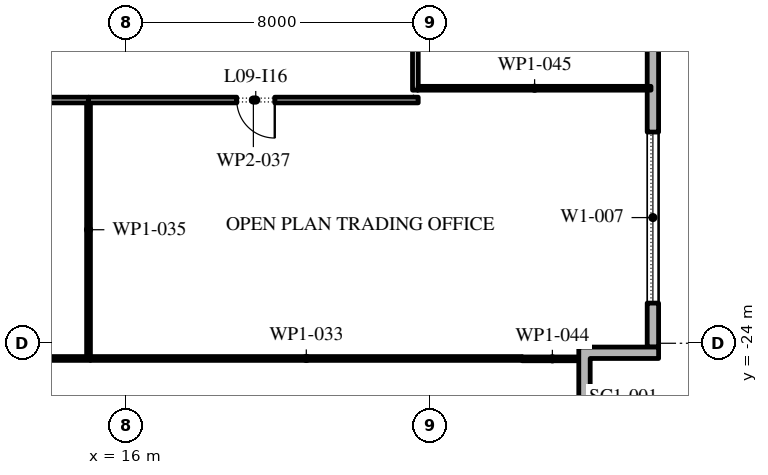
"""IFC4 building model, lengths in metres.
Left out: names, types, materials, properties, quantities, classifications, styles, units other than length and angle.
Written with IfcOpenShell. Run it as: python <this file> out.ifc"""

import sys

from ifc_helpers import new_model, si_unit, direction, frame, frame_2d, origin, place, context, subcontext, project, spatial, polyline, rectangle, outline, extrude, element, fill, save


model = new_model("IFC4")
c1 = context("Model", 3, precision=1e-05, world=origin(), true_north=direction((0.0, 1.0)))
c2 = subcontext(c1, "Body", "Model", "MODEL_VIEW")
j1 = project(units=[si_unit("LENGTHUNIT", "METRE"), si_unit("PLANEANGLEUNIT", "RADIAN")], contexts=[c1])
p1 = place(None, origin())
s1 = spatial("IfcSite", under=j1, at=p1, CompositionType="ELEMENT")
p2 = place(p1, origin())
s2 = spatial("IfcBuilding", under=s1, at=p2, CompositionType="ELEMENT")
p3 = place(p2, frame((0.0, 0.0, 48.0)))
s3 = spatial("IfcBuildingStorey", under=s2, at=p3, CompositionType="ELEMENT", Elevation=48.0)
p4 = place(p3, frame((29.85, -24.1, 0.0), z_axis=(0.0, 0.0, 1.0), x_axis=(0.0, 1.0, 0.0)))
e1 = element("IfcWall", 1, at=p4, inside=s3, PredefinedType="STANDARD", context=c2, shape_type="SweptSolid", body=[
    extrude(rectangle(XDim=49.5, YDim=0.3, at=frame_2d((24.75, 0.0))), origin(), (0.0, 0.0, 1.0), 4.0),
])
p5 = place(p4, frame((1.157, 0.0, 0.45)))
e2 = element("IfcOpeningElement", 2, at=p5, cuts=e1, PredefinedType="OPENING", context=c2, shape_type="SweptSolid", body=[
    extrude(rectangle(XDim=4.5, YDim=3.05, at=frame_2d((2.25, 1.525))), frame((0.0, 0.16, 0.0), z_axis=(0.0, -1.0, 0.0), x_axis=(1.0, 0.0, 0.0)), (0.0, 0.0, 1.0), 0.32),
])
p6 = place(p4, frame((8.121, 0.0, 0.45)))
e3 = element("IfcOpeningElement", 3, at=p6, cuts=e1, PredefinedType="OPENING", context=c2, shape_type="SweptSolid", body=[
    extrude(rectangle(XDim=4.5, YDim=2.825, at=frame_2d((2.25, 1.413))), frame((0.0, 0.16, 0.0), z_axis=(0.0, -1.0, 0.0), x_axis=(1.0, 0.0, 0.0)), (0.0, 0.0, 1.0), 0.32),
])
p7 = place(p4, frame((16.286, 0.0, 0.0)))
e4 = element("IfcOpeningElement", 4, at=p7, cuts=e1, PredefinedType="OPENING", context=c2, shape_type="SweptSolid", body=[
    extrude(rectangle(XDim=2.4, YDim=3.325, at=frame_2d((1.2, 1.663))), frame((0.0, 0.16, 0.0), z_axis=(0.0, -1.0, 0.0), x_axis=(1.0, 0.0, 0.0)), (0.0, 0.0, 1.0), 0.32),
])
p8 = place(p4, frame((22.35, 0.0, 0.45)))
e5 = element("IfcOpeningElement", 5, at=p8, cuts=e1, PredefinedType="OPENING", context=c2, shape_type="SweptSolid", body=[
    extrude(rectangle(XDim=4.5, YDim=2.875, at=frame_2d((2.25, 1.438))), frame((0.0, 0.16, 0.0), z_axis=(0.0, -1.0, 0.0), x_axis=(1.0, 0.0, 0.0)), (0.0, 0.0, 1.0), 0.32),
])
p9 = place(p4, frame((29.464, 0.0, 0.45)))
e6 = element("IfcOpeningElement", 6, at=p9, cuts=e1, PredefinedType="OPENING", context=c2, shape_type="SweptSolid", body=[
    extrude(rectangle(XDim=4.5, YDim=2.875, at=frame_2d((2.25, 1.438))), frame((0.0, 0.16, 0.0), z_axis=(0.0, -1.0, 0.0), x_axis=(1.0, 0.0, 0.0)), (0.0, 0.0, 1.0), 0.32),
])
p10 = place(p4, frame((36.579, 0.0, 0.45)))
e7 = element("IfcOpeningElement", 7, at=p10, cuts=e1, PredefinedType="OPENING", context=c2, shape_type="SweptSolid", body=[
    extrude(rectangle(XDim=4.5, YDim=3.05, at=frame_2d((2.25, 1.525))), frame((0.0, 0.16, 0.0), z_axis=(0.0, -1.0, 0.0), x_axis=(1.0, 0.0, 0.0)), (0.0, 0.0, 1.0), 0.32),
])
p11 = place(p4, frame((44.743, 0.0, 0.0)))
e8 = element("IfcOpeningElement", 8, at=p11, cuts=e1, PredefinedType="OPENING", context=c2, shape_type="SweptSolid", body=[
    extrude(rectangle(XDim=2.4, YDim=3.325, at=frame_2d((1.2, 1.663))), frame((0.0, 0.16, 0.0), z_axis=(0.0, -1.0, 0.0), x_axis=(1.0, 0.0, 0.0)), (0.0, 0.0, 1.0), 0.32),
])
p12 = place(p3, origin())
e9 = element("IfcWall", 9, at=p12, inside=s3, PredefinedType="STANDARD", context=c2, shape_type="SweptSolid", body=[
    extrude(outline(polyline([(27.9, -25.9), (27.9, -24.1), (30.0, -24.1), (30.0, -24.4), (28.2, -24.4), (28.2, -26.2), (26.4, -26.2), (26.4, -27.7), (26.1, -27.7), (26.1, -25.9), (27.9, -25.9)])), origin(), (0.0, 0.0, 1.0), 4.0),
])
p13 = place(p3, frame((1.45, -24.4, 0.0), z_axis=(0.0, 0.0, 1.0), x_axis=(1.0, 0.0, 0.0)))
e10 = element("IfcWall", 10, at=p13, inside=s3, PredefinedType="PARTITIONING", context=c2, shape_type="SweptSolid", body=[
    extrude(rectangle(XDim=13.6, YDim=0.1, at=frame_2d((6.8, 0.0))), origin(), (0.0, 0.0, 1.0), 4.0),
])
p14 = place(p3, frame((15.05, -24.4, 0.0), z_axis=(0.0, 0.0, 1.0), x_axis=(1.0, 0.0, 0.0)))
e11 = element("IfcWall", 11, at=p14, inside=s3, PredefinedType="PARTITIONING", context=c2, shape_type="SweptSolid", body=[
    extrude(rectangle(XDim=11.36, YDim=0.1, at=frame_2d((5.68, 0.0))), origin(), (0.0, 0.0, 1.0), 4.0),
])
p15 = place(p3, frame((15.0, -17.6, 0.0), z_axis=(0.0, 0.0, 1.0), x_axis=(-1.0, 0.0, 0.0)))
e12 = element("IfcWall", 12, at=p15, inside=s3, PredefinedType="PARTITIONING", context=c2, shape_type="SweptSolid", body=[
    extrude(rectangle(XDim=6.525, YDim=0.15, at=frame_2d((3.262, 0.0))), origin(), (0.0, 0.0, 1.0), 4.0),
])
p16 = place(p15, frame((2.7, 0.0, 0.0)))
e13 = element("IfcOpeningElement", 13, at=p16, cuts=e12, PredefinedType="OPENING", context=c2, shape_type="SweptSolid", body=[
    extrude(rectangle(XDim=1.0, YDim=2.1, at=frame_2d((0.5, 1.05))), frame((0.0, 0.085, 0.0), z_axis=(0.0, -1.0, 0.0), x_axis=(1.0, 0.0, 0.0)), (0.0, 0.0, 1.0), 0.17),
])
p17 = place(p3, frame((15.0, -17.675, 0.0), z_axis=(0.0, 0.0, 1.0), x_axis=(0.0, -1.0, 0.0)))
e14 = element("IfcWall", 14, at=p17, inside=s3, PredefinedType="PARTITIONING", context=c2, shape_type="SweptSolid", body=[
    extrude(rectangle(XDim=6.675, YDim=0.1, at=frame_2d((3.337, 0.0))), origin(), (0.0, 0.0, 1.0), 4.0),
])
p18 = place(p3, frame((23.675, -17.6, 0.0), z_axis=(0.0, 0.0, 1.0), x_axis=(-1.0, 0.0, 0.0)))
e15 = element("IfcWall", 15, at=p18, inside=s3, PredefinedType="PARTITIONING", context=c2, shape_type="SweptSolid", body=[
    extrude(rectangle(XDim=8.675, YDim=0.15, at=frame_2d((4.337, 0.0))), origin(), (0.0, 0.0, 1.0), 4.0),
])
p19 = place(p18, frame((3.775, 0.0, 0.0)))
e16 = element("IfcOpeningElement", 16, at=p19, cuts=e15, PredefinedType="OPENING", context=c2, shape_type="SweptSolid", body=[
    extrude(rectangle(XDim=1.0, YDim=2.1, at=frame_2d((0.5, 1.05))), frame((0.0, 0.085, 0.0), z_axis=(0.0, -1.0, 0.0), x_axis=(1.0, 0.0, 0.0)), (0.0, 0.0, 1.0), 0.17),
])
p20 = place(p3, frame((23.6, -10.22, 0.0), z_axis=(0.0, 0.0, 1.0), x_axis=(0.0, -1.0, 0.0)))
e17 = element("IfcWall", 17, at=p20, inside=s3, PredefinedType="PARTITIONING", context=c2, shape_type="SweptSolid", body=[
    extrude(rectangle(XDim=7.12, YDim=0.15, at=frame_2d((3.56, 0.0))), origin(), (0.0, 0.0, 1.0), 4.0),
])
p21 = place(p20, frame((2.42, 0.0, 0.0)))
e18 = element("IfcOpeningElement", 18, at=p21, cuts=e17, PredefinedType="OPENING", context=c2, shape_type="SweptSolid", body=[
    extrude(rectangle(XDim=1.0, YDim=2.1, at=frame_2d((0.5, 1.05))), frame((0.0, 0.085, 0.0), z_axis=(0.0, -1.0, 0.0), x_axis=(1.0, 0.0, 0.0)), (0.0, 0.0, 1.0), 0.17),
])
p22 = place(p3, frame((26.41, -24.41, 0.0), z_axis=(0.0, 0.0, 1.0), x_axis=(1.0, 0.0, 0.0)))
e19 = element("IfcWall", 19, at=p22, inside=s3, PredefinedType="PARTITIONING", context=c2, shape_type="SweptSolid", body=[
    extrude(rectangle(XDim=1.59, YDim=0.1, at=frame_2d((0.795, 0.0))), origin(), (0.0, 0.0, 1.0), 4.0),
])
p23 = place(p3, frame((29.8, -17.29, 0.0), z_axis=(0.0, 0.0, 1.0), x_axis=(-1.0, 0.0, 0.0)))
e20 = element("IfcWall", 20, at=p23, inside=s3, PredefinedType="PARTITIONING", context=c2, shape_type="SweptSolid", body=[
    extrude(rectangle(XDim=6.125, YDim=0.1, at=frame_2d((3.062, 0.0))), origin(), (0.0, 0.0, 1.0), 4.0),
])
p24 = place(p5, origin())
e21 = element("IfcWindow", 21, at=p24, inside=s3, PartitioningType="DOUBLE_PANEL_VERTICAL", PredefinedType="WINDOW", context=c2, shape_type="SweptSolid", body=[
    extrude(rectangle(XDim=4.5, YDim=3.05, at=frame_2d((2.25, 1.525))), frame((0.0, 0.03, 0.0), z_axis=(0.0, -1.0, 0.0), x_axis=(1.0, 0.0, 0.0)), (0.0, 0.0, 1.0), 0.06),
])
fill(e2, e21)
p25 = place(p19, origin())
e22 = element("IfcDoor", 22, at=p25, inside=s3, OperationType="SINGLE_SWING_RIGHT", PredefinedType="DOOR", context=c2, shape_type="SweptSolid", body=[
    extrude(rectangle(XDim=1.0, YDim=2.1, at=frame_2d((0.5, 1.05))), frame((0.0, 0.025, 0.0), z_axis=(0.0, -1.0, 0.0), x_axis=(1.0, 0.0, 0.0)), (0.0, 0.0, 1.0), 0.05),
])
fill(e16, e22)
save(model, sys.argv[1])
